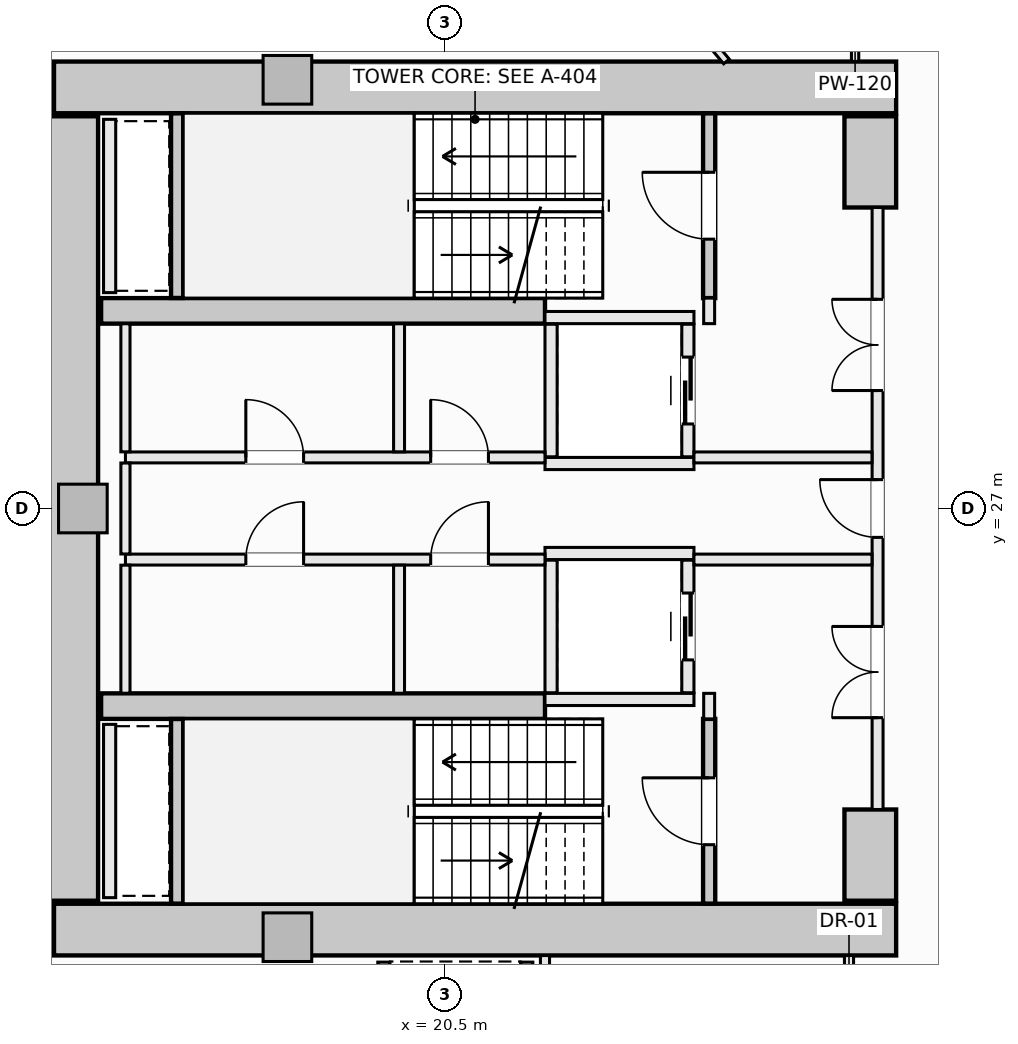
"""IFC4 building model, lengths in metres.
Left out: names, types, materials, properties, quantities, classifications, styles, units other than length and angle.
Written with IfcOpenShell. Run it as: python <this file> out.ifc"""

import sys

from ifc_helpers import new_model, si_unit, direction, frame, frame_2d, origin, origin_2d, place, context, subcontext, project, spatial, rectangle, extrude, element, fill, save


model = new_model("IFC4")
c1 = context("Model", 3, precision=1e-05, world=origin(), true_north=direction((0.0, 1.0)))
c2 = subcontext(c1, "Body", "Model", "MODEL_VIEW")
j1 = project(units=[si_unit("LENGTHUNIT", "METRE"), si_unit("PLANEANGLEUNIT", "RADIAN")], contexts=[c1])
p1 = place(None, origin())
s1 = spatial("IfcSite", under=j1, at=p1, CompositionType="ELEMENT")
p2 = place(p1, origin())
s2 = spatial("IfcBuilding", under=s1, at=p2, CompositionType="ELEMENT")
p3 = place(p2, frame((0.0, 0.0, 76.55)))
s3 = spatial("IfcBuildingStorey", under=s2, at=p3, CompositionType="ELEMENT", Elevation=76.55)
for number, where, z_axis, x_axis in (
    (1, (14.075, 33.925, -0.28), (0.0, 0.0, 1.0), (1.0, 0.0, 0.0)),
    (2, (14.075, 20.075, -0.28), (0.0, 0.0, 1.0), (1.0, 0.0, 0.0)),
):
    element("IfcWall", number, at=place(p3, frame(where, z_axis=z_axis, x_axis=x_axis)), inside=s3, PredefinedType="SHEAR", context=c2, shape_type="SweptSolid", body=[
        extrude(rectangle(XDim=13.85, YDim=0.85, at=frame_2d((6.925, 0.0))), origin(), (0.0, 0.0, 1.0), 3.85),
    ])
p4 = place(p3, frame((14.375, 20.55, -0.28), z_axis=(0.0, 0.0, 1.0), x_axis=(0.0, 1.0, 0.0)))
e3 = element("IfcWall", 3, at=p4, inside=s3, PredefinedType="SHEAR", context=c2, shape_type="SweptSolid", body=[
    extrude(rectangle(XDim=12.9, YDim=0.85, at=frame_2d((6.45, 0.0))), origin(), (0.0, 0.0, 1.0), 3.85),
])
for number, where, z_axis, x_axis in (
    (4, (27.5, 31.95, -0.28), (0.0, 0.0, 1.0), (0.0, 1.0, 0.0)),
    (5, (27.5, 20.55, -0.28), (0.0, 0.0, 1.0), (0.0, 1.0, 0.0)),
):
    element("IfcWall", number, at=place(p3, frame(where, z_axis=z_axis, x_axis=x_axis)), inside=s3, PredefinedType="SHEAR", context=c2, shape_type="SweptSolid", body=[
        extrude(rectangle(XDim=1.5, YDim=0.85, at=frame_2d((0.75, 0.0))), origin(), (0.0, 0.0, 1.0), 3.85),
    ])
for number, where, z_axis, x_axis in (
    (6, (14.85, 30.25, -0.28), (0.0, 0.0, 1.0), (1.0, 0.0, 0.0)),
    (7, (14.85, 23.75, -0.28), (0.0, 0.0, 1.0), (1.0, 0.0, 0.0)),
):
    element("IfcWall", number, at=place(p3, frame(where, z_axis=z_axis, x_axis=x_axis)), inside=s3, PredefinedType="SHEAR", context=c2, shape_type="SweptSolid", body=[
        extrude(rectangle(XDim=7.3, YDim=0.42, at=frame_2d((3.65, 0.0))), origin(), (0.0, 0.0, 1.0), 3.85),
    ])
for number, where, z_axis, x_axis in (
    (8, (17.914, 34.05, -0.28), (0.0, 0.0, 1.0), (1.0, 0.0, 0.0)),
    (9, (14.55, 27.0, -0.28), (0.0, 0.0, 1.0), (1.0, 0.0, 0.0)),
    (10, (17.914, 19.95, -0.28), (0.0, 0.0, 1.0), (1.0, 0.0, 0.0)),
):
    element("IfcColumn", number, at=place(p3, frame(where, z_axis=z_axis, x_axis=x_axis)), inside=s3, PredefinedType="PILASTER", context=c2, shape_type="SweptSolid", body=[
        extrude(rectangle(XDim=0.8, YDim=0.8, at=origin_2d()), origin(), (0.0, 0.0, 1.0), 3.85),
    ])
p5 = place(p3, frame((24.85, 30.46, -0.28), z_axis=(0.0, 0.0, 1.0), x_axis=(0.0, 1.0, 0.0)))
e11 = element("IfcWall", 11, at=p5, inside=s3, PredefinedType="SHEAR", context=c2, shape_type="SweptSolid", body=[
    extrude(rectangle(XDim=3.038, YDim=0.2, at=frame_2d((1.519, 0.0))), origin(), (0.0, 0.0, 1.0), 3.85),
])
p6 = place(p5, frame((0.969, 0.0, 0.28)))
e12 = element("IfcOpeningElement", 12, at=p6, cuts=e11, PredefinedType="OPENING", context=c2, shape_type="SweptSolid", body=[
    extrude(rectangle(XDim=1.1, YDim=2.15, at=frame_2d((0.55, 1.075))), frame((0.0, 0.11, 0.0), z_axis=(0.0, -1.0, 0.0), x_axis=(1.0, 0.0, 0.0)), (0.0, 0.0, 1.0), 0.22),
])
p7 = place(p3, frame((16.1, 30.462, -0.28), z_axis=(0.0, 0.0, 1.0), x_axis=(0.0, 1.0, 0.0)))
e13 = element("IfcWall", 13, at=p7, inside=s3, PredefinedType="SHEAR", context=c2, shape_type="SweptSolid", body=[
    extrude(rectangle(XDim=3.036, YDim=0.2, at=frame_2d((1.518, 0.0))), origin(), (0.0, 0.0, 1.0), 3.85),
])
p8 = place(p3, frame((24.85, 20.502, -0.28), z_axis=(0.0, 0.0, 1.0), x_axis=(0.0, 1.0, 0.0)))
e14 = element("IfcWall", 14, at=p8, inside=s3, PredefinedType="SHEAR", context=c2, shape_type="SweptSolid", body=[
    extrude(rectangle(XDim=3.038, YDim=0.2, at=frame_2d((1.519, 0.0))), origin(), (0.0, 0.0, 1.0), 3.85),
])
p9 = place(p8, frame((0.969, 0.0, 0.28)))
e15 = element("IfcOpeningElement", 15, at=p9, cuts=e14, PredefinedType="OPENING", context=c2, shape_type="SweptSolid", body=[
    extrude(rectangle(XDim=1.1, YDim=2.15, at=frame_2d((0.55, 1.075))), frame((0.0, 0.11, 0.0), z_axis=(0.0, -1.0, 0.0), x_axis=(1.0, 0.0, 0.0)), (0.0, 0.0, 1.0), 0.22),
])
p10 = place(p3, frame((16.1, 20.502, -0.28), z_axis=(0.0, 0.0, 1.0), x_axis=(0.0, 1.0, 0.0)))
e16 = element("IfcWall", 16, at=p10, inside=s3, PredefinedType="SHEAR", context=c2, shape_type="SweptSolid", body=[
    extrude(rectangle(XDim=3.036, YDim=0.2, at=frame_2d((1.518, 0.0))), origin(), (0.0, 0.0, 1.0), 3.85),
])
for number, where, z_axis, x_axis in (
    (17, (22.15, 30.14, 0.0), (0.0, 0.0, 1.0), (1.0, 0.0, 0.0)),
    (18, (22.15, 27.74, 0.0), (0.0, 0.0, 1.0), (1.0, 0.0, 0.0)),
):
    element("IfcWall", number, at=place(p3, frame(where, z_axis=z_axis, x_axis=x_axis)), inside=s3, PredefinedType="SOLIDWALL", context=c2, shape_type="SweptSolid", body=[
        extrude(rectangle(XDim=2.45, YDim=0.2, at=frame_2d((1.225, 0.0))), origin(), (0.0, 0.0, 1.0), 3.57),
    ])
p11 = place(p3, frame((22.25, 27.85, 0.0), z_axis=(0.0, 0.0, 1.0), x_axis=(0.0, 1.0, 0.0)))
e19 = element("IfcWall", 19, at=p11, inside=s3, PredefinedType="SOLIDWALL", context=c2, shape_type="SweptSolid", body=[
    extrude(rectangle(XDim=2.18, YDim=0.2, at=frame_2d((1.09, 0.0))), origin(), (0.0, 0.0, 1.0), 3.57),
])
p12 = place(p3, frame((24.5, 27.85, 0.0), z_axis=(0.0, 0.0, 1.0), x_axis=(0.0, 1.0, 0.0)))
e20 = element("IfcWall", 20, at=p12, inside=s3, PredefinedType="SOLIDWALL", context=c2, shape_type="SweptSolid", body=[
    extrude(rectangle(XDim=2.18, YDim=0.2, at=frame_2d((1.09, 0.0))), origin(), (0.0, 0.0, 1.0), 3.57),
])
p13 = place(p12, frame((0.54, 0.0, 0.0)))
e21 = element("IfcOpeningElement", 21, at=p13, cuts=e20, PredefinedType="OPENING", context=c2, shape_type="SweptSolid", body=[
    extrude(rectangle(XDim=1.1, YDim=2.2, at=frame_2d((0.55, 1.1))), frame((0.0, 0.11, 0.0), z_axis=(0.0, -1.0, 0.0), x_axis=(1.0, 0.0, 0.0)), (0.0, 0.0, 1.0), 0.22),
])
for number, where, z_axis, x_axis in (
    (22, (22.15, 26.26, 0.0), (0.0, 0.0, 1.0), (1.0, 0.0, 0.0)),
    (23, (22.15, 23.86, 0.0), (0.0, 0.0, 1.0), (1.0, 0.0, 0.0)),
):
    element("IfcWall", number, at=place(p3, frame(where, z_axis=z_axis, x_axis=x_axis)), inside=s3, PredefinedType="SOLIDWALL", context=c2, shape_type="SweptSolid", body=[
        extrude(rectangle(XDim=2.45, YDim=0.2, at=frame_2d((1.225, 0.0))), origin(), (0.0, 0.0, 1.0), 3.57),
    ])
p14 = place(p3, frame((22.25, 23.97, 0.0), z_axis=(0.0, 0.0, 1.0), x_axis=(0.0, 1.0, 0.0)))
e24 = element("IfcWall", 24, at=p14, inside=s3, PredefinedType="SOLIDWALL", context=c2, shape_type="SweptSolid", body=[
    extrude(rectangle(XDim=2.18, YDim=0.2, at=frame_2d((1.09, 0.0))), origin(), (0.0, 0.0, 1.0), 3.57),
])
p15 = place(p3, frame((24.5, 23.97, 0.0), z_axis=(0.0, 0.0, 1.0), x_axis=(0.0, 1.0, 0.0)))
e25 = element("IfcWall", 25, at=p15, inside=s3, PredefinedType="SOLIDWALL", context=c2, shape_type="SweptSolid", body=[
    extrude(rectangle(XDim=2.18, YDim=0.2, at=frame_2d((1.09, 0.0))), origin(), (0.0, 0.0, 1.0), 3.57),
])
p16 = place(p15, frame((0.54, 0.0, 0.0)))
e26 = element("IfcOpeningElement", 26, at=p16, cuts=e25, PredefinedType="OPENING", context=c2, shape_type="SweptSolid", body=[
    extrude(rectangle(XDim=1.1, YDim=2.2, at=frame_2d((0.55, 1.1))), frame((0.0, 0.11, 0.0), z_axis=(0.0, -1.0, 0.0), x_axis=(1.0, 0.0, 0.0)), (0.0, 0.0, 1.0), 0.22),
])
for number, where, z_axis, x_axis in (
    (27, (19.5, 17.01, 0.0), (0.0, 0.0, 1.0), (0.0, 1.0, 0.0)),
    (28, (21.85, 17.01, 0.0), (0.0, 0.0, 1.0), (0.0, 1.0, 0.0)),
):
    element("IfcWall", number, at=place(p3, frame(where, z_axis=z_axis, x_axis=x_axis)), inside=s3, PredefinedType="SOLIDWALL", context=c2, shape_type="SweptSolid", body=[
        extrude(rectangle(XDim=2.53, YDim=0.2, at=frame_2d((1.265, 0.0))), origin(), (0.0, 0.0, 1.0), 3.57),
    ])
for number, where, z_axis, x_axis in (
    (29, (14.99, 30.55, 0.0), (0.0, 0.0, 1.0), (0.0, 1.0, 0.0)),
    (30, (14.99, 20.6, 0.0), (0.0, 0.0, 1.0), (0.0, 1.0, 0.0)),
):
    element("IfcWall", number, at=place(p3, frame(where, z_axis=z_axis, x_axis=x_axis)), inside=s3, PredefinedType="SOLIDWALL", context=c2, shape_type="SweptSolid", body=[
        extrude(rectangle(XDim=2.85, YDim=0.2, at=frame_2d((1.425, 0.0))), origin(), (0.0, 0.0, 1.0), 3.57),
    ])
for number, where, z_axis, x_axis in (
    (31, (24.85, 23.54, 0.0), (0.0, 0.0, 1.0), (0.0, 1.0, 0.0)),
    (32, (24.85, 30.04, 0.0), (0.0, 0.0, 1.0), (0.0, 1.0, 0.0)),
):
    element("IfcWall", number, at=place(p3, frame(where, z_axis=z_axis, x_axis=x_axis)), inside=s3, PredefinedType="SOLIDWALL", context=c2, shape_type="SweptSolid", body=[
        extrude(rectangle(XDim=0.42, YDim=0.18, at=frame_2d((0.21, 0.0))), origin(), (0.0, 0.0, 1.0), 3.57),
    ])
p17 = place(p3, frame((27.62, 22.05, 0.0), z_axis=(0.0, 0.0, 1.0), x_axis=(0.0, 1.0, 0.0)))
e33 = element("IfcWall", 33, at=p17, inside=s3, PredefinedType="SOLIDWALL", context=c2, shape_type="SweptSolid", body=[
    extrude(rectangle(XDim=9.9, YDim=0.18, at=frame_2d((4.95, 0.0))), origin(), (0.0, 0.0, 1.0), 2.662),
])
p18 = place(p17, frame((4.475, 0.0, 0.0)))
e34 = element("IfcOpeningElement", 34, at=p18, cuts=e33, PredefinedType="OPENING", context=c2, shape_type="SweptSolid", body=[
    extrude(rectangle(XDim=0.95, YDim=2.1, at=frame_2d((0.475, 1.05))), frame((0.0, 0.1, 0.0), z_axis=(0.0, -1.0, 0.0), x_axis=(1.0, 0.0, 0.0)), (0.0, 0.0, 1.0), 0.2),
])
p19 = place(p17, frame((6.89, 0.0, 0.0)))
e35 = element("IfcOpeningElement", 35, at=p19, cuts=e33, PredefinedType="OPENING", context=c2, shape_type="SweptSolid", body=[
    extrude(rectangle(XDim=1.5, YDim=2.2, at=frame_2d((0.75, 1.1))), frame((0.0, 0.1, 0.0), z_axis=(0.0, -1.0, 0.0), x_axis=(1.0, 0.0, 0.0)), (0.0, 0.0, 1.0), 0.2),
])
p20 = place(p17, frame((1.51, 0.0, 0.0)))
e36 = element("IfcOpeningElement", 36, at=p20, cuts=e33, PredefinedType="OPENING", context=c2, shape_type="SweptSolid", body=[
    extrude(rectangle(XDim=1.5, YDim=2.2, at=frame_2d((0.75, 1.1))), frame((0.0, 0.1, 0.0), z_axis=(0.0, -1.0, 0.0), x_axis=(1.0, 0.0, 0.0)), (0.0, 0.0, 1.0), 0.2),
])
p21 = place(p3, frame((15.25, 27.84, 0.0), z_axis=(0.0, 0.0, 1.0), x_axis=(1.0, 0.0, 0.0)))
e37 = element("IfcWall", 37, at=p21, inside=s3, PredefinedType="SOLIDWALL", context=c2, shape_type="SweptSolid", body=[
    extrude(rectangle(XDim=6.9, YDim=0.18, at=frame_2d((3.45, 0.0))), origin(), (0.0, 0.0, 1.0), 3.57),
])
p22 = place(p21, frame((5.02, 0.0, 0.0)))
e38 = element("IfcOpeningElement", 38, at=p22, cuts=e37, PredefinedType="OPENING", context=c2, shape_type="SweptSolid", body=[
    extrude(rectangle(XDim=0.95, YDim=2.1, at=frame_2d((0.475, 1.05))), frame((0.0, 0.1, 0.0), z_axis=(0.0, -1.0, 0.0), x_axis=(1.0, 0.0, 0.0)), (0.0, 0.0, 1.0), 0.2),
])
p23 = place(p21, frame((1.98, 0.0, 0.0)))
e39 = element("IfcOpeningElement", 39, at=p23, cuts=e37, PredefinedType="OPENING", context=c2, shape_type="SweptSolid", body=[
    extrude(rectangle(XDim=0.95, YDim=2.1, at=frame_2d((0.475, 1.05))), frame((0.0, 0.1, 0.0), z_axis=(0.0, -1.0, 0.0), x_axis=(1.0, 0.0, 0.0)), (0.0, 0.0, 1.0), 0.2),
])
p24 = place(p3, frame((24.6, 27.84, 0.0), z_axis=(0.0, 0.0, 1.0), x_axis=(1.0, 0.0, 0.0)))
e40 = element("IfcWall", 40, at=p24, inside=s3, PredefinedType="SOLIDWALL", context=c2, shape_type="SweptSolid", body=[
    extrude(rectangle(XDim=2.928, YDim=0.18, at=frame_2d((1.464, 0.0))), origin(), (0.0, 0.0, 1.0), 3.57),
])
p25 = place(p3, frame((15.25, 26.16, 0.0), z_axis=(0.0, 0.0, 1.0), x_axis=(1.0, 0.0, 0.0)))
e41 = element("IfcWall", 41, at=p25, inside=s3, PredefinedType="SOLIDWALL", context=c2, shape_type="SweptSolid", body=[
    extrude(rectangle(XDim=6.9, YDim=0.18, at=frame_2d((3.45, 0.0))), origin(), (0.0, 0.0, 1.0), 3.57),
])
p26 = place(p25, frame((5.02, 0.0, 0.0)))
e42 = element("IfcOpeningElement", 42, at=p26, cuts=e41, PredefinedType="OPENING", context=c2, shape_type="SweptSolid", body=[
    extrude(rectangle(XDim=0.95, YDim=2.1, at=frame_2d((0.475, 1.05))), frame((0.0, 0.1, 0.0), z_axis=(0.0, -1.0, 0.0), x_axis=(1.0, 0.0, 0.0)), (0.0, 0.0, 1.0), 0.2),
])
p27 = place(p25, frame((1.98, 0.0, 0.0)))
e43 = element("IfcOpeningElement", 43, at=p27, cuts=e41, PredefinedType="OPENING", context=c2, shape_type="SweptSolid", body=[
    extrude(rectangle(XDim=0.95, YDim=2.1, at=frame_2d((0.475, 1.05))), frame((0.0, 0.1, 0.0), z_axis=(0.0, -1.0, 0.0), x_axis=(1.0, 0.0, 0.0)), (0.0, 0.0, 1.0), 0.2),
])
p28 = place(p3, frame((24.6, 26.16, 0.0), z_axis=(0.0, 0.0, 1.0), x_axis=(1.0, 0.0, 0.0)))
e44 = element("IfcWall", 44, at=p28, inside=s3, PredefinedType="SOLIDWALL", context=c2, shape_type="SweptSolid", body=[
    extrude(rectangle(XDim=2.928, YDim=0.18, at=frame_2d((1.464, 0.0))), origin(), (0.0, 0.0, 1.0), 3.57),
])
p29 = place(p3, frame((15.25, 23.962, 0.0), z_axis=(0.0, 0.0, 1.0), x_axis=(0.0, 1.0, 0.0)))
e45 = element("IfcWall", 45, at=p29, inside=s3, PredefinedType="PARTITIONING", context=c2, shape_type="SweptSolid", body=[
    extrude(rectangle(XDim=2.106, YDim=0.15, at=frame_2d((1.053, 0.0))), origin(), (0.0, 0.0, 1.0), 3.57),
])
p30 = place(p3, frame((15.25, 26.252, 0.0), z_axis=(0.0, 0.0, 1.0), x_axis=(0.0, 1.0, 0.0)))
e46 = element("IfcWall", 46, at=p30, inside=s3, PredefinedType="PARTITIONING", context=c2, shape_type="SweptSolid", body=[
    extrude(rectangle(XDim=1.496, YDim=0.15, at=frame_2d((0.748, 0.0))), origin(), (0.0, 0.0, 1.0), 3.57),
])
p31 = place(p3, frame((15.25, 27.932, 0.0), z_axis=(0.0, 0.0, 1.0), x_axis=(0.0, 1.0, 0.0)))
e47 = element("IfcWall", 47, at=p31, inside=s3, PredefinedType="PARTITIONING", context=c2, shape_type="SweptSolid", body=[
    extrude(rectangle(XDim=2.106, YDim=0.15, at=frame_2d((1.053, 0.0))), origin(), (0.0, 0.0, 1.0), 3.57),
])
for number, where, z_axis, x_axis in (
    (48, (19.75, 23.962, 0.0), (0.0, 0.0, 1.0), (0.0, 1.0, 0.0)),
    (49, (19.75, 27.932, 0.0), (0.0, 0.0, 1.0), (0.0, 1.0, 0.0)),
):
    element("IfcWall", number, at=place(p3, frame(where, z_axis=z_axis, x_axis=x_axis)), inside=s3, PredefinedType="SOLIDWALL", context=c2, shape_type="SweptSolid", body=[
        extrude(rectangle(XDim=2.106, YDim=0.18, at=frame_2d((1.053, 0.0))), origin(), (0.0, 0.0, 1.0), 3.57),
    ])
p32 = place(p3, frame((22.15, 17.127, 0.0), z_axis=(0.0, 0.0, 1.0), x_axis=(0.0, 1.0, 0.0)))
e50 = element("IfcWall", 50, at=p32, inside=s3, PredefinedType="PARTITIONING", context=c2, shape_type="SweptSolid", body=[
    extrude(rectangle(XDim=2.521, YDim=0.15, at=frame_2d((1.26, 0.0))), origin(), (0.0, 0.0, 1.0), 3.57),
])
p33 = place(p3, frame((27.15, 17.127, 0.0), z_axis=(0.0, 0.0, 1.0), x_axis=(0.0, 1.0, 0.0)))
e51 = element("IfcWall", 51, at=p33, inside=s3, PredefinedType="PARTITIONING", context=c2, shape_type="SweptSolid", body=[
    extrude(rectangle(XDim=2.521, YDim=0.15, at=frame_2d((1.26, 0.0))), origin(), (0.0, 0.0, 1.0), 3.57),
])
p34 = place(p33, frame((0.785, 0.0, 0.0)))
e52 = element("IfcOpeningElement", 52, at=p34, cuts=e51, PredefinedType="OPENING", context=c2, shape_type="SweptSolid", body=[
    extrude(rectangle(XDim=0.95, YDim=2.1, at=frame_2d((0.475, 1.05))), frame((0.0, 0.085, 0.0), z_axis=(0.0, -1.0, 0.0), x_axis=(1.0, 0.0, 0.0)), (0.0, 0.0, 1.0), 0.17),
])
p35 = place(p3, frame((27.25, 34.352, 0.0), z_axis=(0.0, 0.0, 1.0), x_axis=(0.0, 1.0, 0.0)))
e53 = element("IfcWall", 53, at=p35, inside=s3, PredefinedType="PARTITIONING", context=c2, shape_type="SweptSolid", body=[
    extrude(rectangle(XDim=0.606, YDim=0.12, at=frame_2d((0.303, 0.0))), origin(), (0.0, 0.0, 1.0), 3.57),
])
p36 = place(p3, frame((24.626, 34.958, 0.0), z_axis=(0.0, 0.0, 1.0), x_axis=(0.643032873298, -0.765838575588, 0.0)))
e54 = element("IfcWall", 54, at=p36, inside=s3, PredefinedType="PARTITIONING", context=c2, shape_type="SweptSolid", body=[
    extrude(rectangle(XDim=0.791, YDim=0.12, at=frame_2d((0.396, 0.0))), origin(), (0.0, 0.0, 1.0), 3.57),
])
p37 = place(p6, origin())
e55 = element("IfcDoor", 55, at=p37, inside=s3, OperationType="SINGLE_SWING_RIGHT", PredefinedType="DOOR", context=c2, shape_type="SweptSolid", body=[
    extrude(rectangle(XDim=1.1, YDim=2.15, at=frame_2d((0.55, 1.075))), frame((0.0, 0.025, 0.0), z_axis=(0.0, -1.0, 0.0), x_axis=(1.0, 0.0, 0.0)), (0.0, 0.0, 1.0), 0.05),
])
fill(e12, e55)
p38 = place(p9, origin())
e56 = element("IfcDoor", 56, at=p38, inside=s3, OperationType="SINGLE_SWING_RIGHT", PredefinedType="DOOR", context=c2, shape_type="SweptSolid", body=[
    extrude(rectangle(XDim=1.1, YDim=2.15, at=frame_2d((0.55, 1.075))), frame((0.0, 0.025, 0.0), z_axis=(0.0, -1.0, 0.0), x_axis=(1.0, 0.0, 0.0)), (0.0, 0.0, 1.0), 0.05),
])
fill(e15, e56)
p39 = place(p13, origin())
e57 = element("IfcDoor", 57, at=p39, inside=s3, OperationType="SLIDING_TO_LEFT", PredefinedType="DOOR", context=c2, shape_type="SweptSolid", body=[
    extrude(rectangle(XDim=1.1, YDim=2.2, at=frame_2d((0.55, 1.1))), frame((0.0, 0.025, 0.0), z_axis=(0.0, -1.0, 0.0), x_axis=(1.0, 0.0, 0.0)), (0.0, 0.0, 1.0), 0.05),
])
fill(e21, e57)
p40 = place(p16, origin())
e58 = element("IfcDoor", 58, at=p40, inside=s3, OperationType="SLIDING_TO_LEFT", PredefinedType="DOOR", context=c2, shape_type="SweptSolid", body=[
    extrude(rectangle(XDim=1.1, YDim=2.2, at=frame_2d((0.55, 1.1))), frame((0.0, 0.025, 0.0), z_axis=(0.0, -1.0, 0.0), x_axis=(1.0, 0.0, 0.0)), (0.0, 0.0, 1.0), 0.05),
])
fill(e26, e58)
p41 = place(p18, origin())
e59 = element("IfcDoor", 59, at=p41, inside=s3, OperationType="SINGLE_SWING_RIGHT", PredefinedType="DOOR", context=c2, shape_type="SweptSolid", body=[
    extrude(rectangle(XDim=0.95, YDim=2.1, at=frame_2d((0.475, 1.05))), frame((0.0, 0.025, 0.0), z_axis=(0.0, -1.0, 0.0), x_axis=(1.0, 0.0, 0.0)), (0.0, 0.0, 1.0), 0.05),
])
fill(e34, e59)
p42 = place(p19, origin())
e60 = element("IfcDoor", 60, at=p42, inside=s3, OperationType="DOUBLE_DOOR_SINGLE_SWING", PredefinedType="DOOR", context=c2, shape_type="SweptSolid", body=[
    extrude(rectangle(XDim=1.5, YDim=2.2, at=frame_2d((0.75, 1.1))), frame((0.0, 0.025, 0.0), z_axis=(0.0, -1.0, 0.0), x_axis=(1.0, 0.0, 0.0)), (0.0, 0.0, 1.0), 0.05),
])
fill(e35, e60)
p43 = place(p20, origin())
e61 = element("IfcDoor", 61, at=p43, inside=s3, OperationType="DOUBLE_DOOR_SINGLE_SWING", PredefinedType="DOOR", context=c2, shape_type="SweptSolid", body=[
    extrude(rectangle(XDim=1.5, YDim=2.2, at=frame_2d((0.75, 1.1))), frame((0.0, 0.025, 0.0), z_axis=(0.0, -1.0, 0.0), x_axis=(1.0, 0.0, 0.0)), (0.0, 0.0, 1.0), 0.05),
])
fill(e36, e61)
p44 = place(p22, origin())
e62 = element("IfcDoor", 62, at=p44, inside=s3, OperationType="SINGLE_SWING_LEFT", PredefinedType="DOOR", context=c2, shape_type="SweptSolid", body=[
    extrude(rectangle(XDim=0.95, YDim=2.1, at=frame_2d((0.475, 1.05))), frame((0.0, 0.025, 0.0), z_axis=(0.0, -1.0, 0.0), x_axis=(1.0, 0.0, 0.0)), (0.0, 0.0, 1.0), 0.05),
])
fill(e38, e62)
p45 = place(p26, origin())
e63 = element("IfcDoor", 63, at=p45, inside=s3, OperationType="SINGLE_SWING_RIGHT", PredefinedType="DOOR", context=c2, shape_type="SweptSolid", body=[
    extrude(rectangle(XDim=0.95, YDim=2.1, at=frame_2d((0.475, 1.05))), frame((0.0, 0.025, 0.0), z_axis=(0.0, -1.0, 0.0), x_axis=(1.0, 0.0, 0.0)), (0.0, 0.0, 1.0), 0.05),
])
fill(e42, e63)
p46 = place(p23, origin())
e64 = element("IfcDoor", 64, at=p46, inside=s3, OperationType="SINGLE_SWING_LEFT", PredefinedType="DOOR", context=c2, shape_type="SweptSolid", body=[
    extrude(rectangle(XDim=0.95, YDim=2.1, at=frame_2d((0.475, 1.05))), frame((0.0, 0.025, 0.0), z_axis=(0.0, -1.0, 0.0), x_axis=(1.0, 0.0, 0.0)), (0.0, 0.0, 1.0), 0.05),
])
fill(e39, e64)
p47 = place(p27, origin())
e65 = element("IfcDoor", 65, at=p47, inside=s3, OperationType="SINGLE_SWING_RIGHT", PredefinedType="DOOR", context=c2, shape_type="SweptSolid", body=[
    extrude(rectangle(XDim=0.95, YDim=2.1, at=frame_2d((0.475, 1.05))), frame((0.0, 0.025, 0.0), z_axis=(0.0, -1.0, 0.0), x_axis=(1.0, 0.0, 0.0)), (0.0, 0.0, 1.0), 0.05),
])
fill(e43, e65)
save(model, sys.argv[1])
